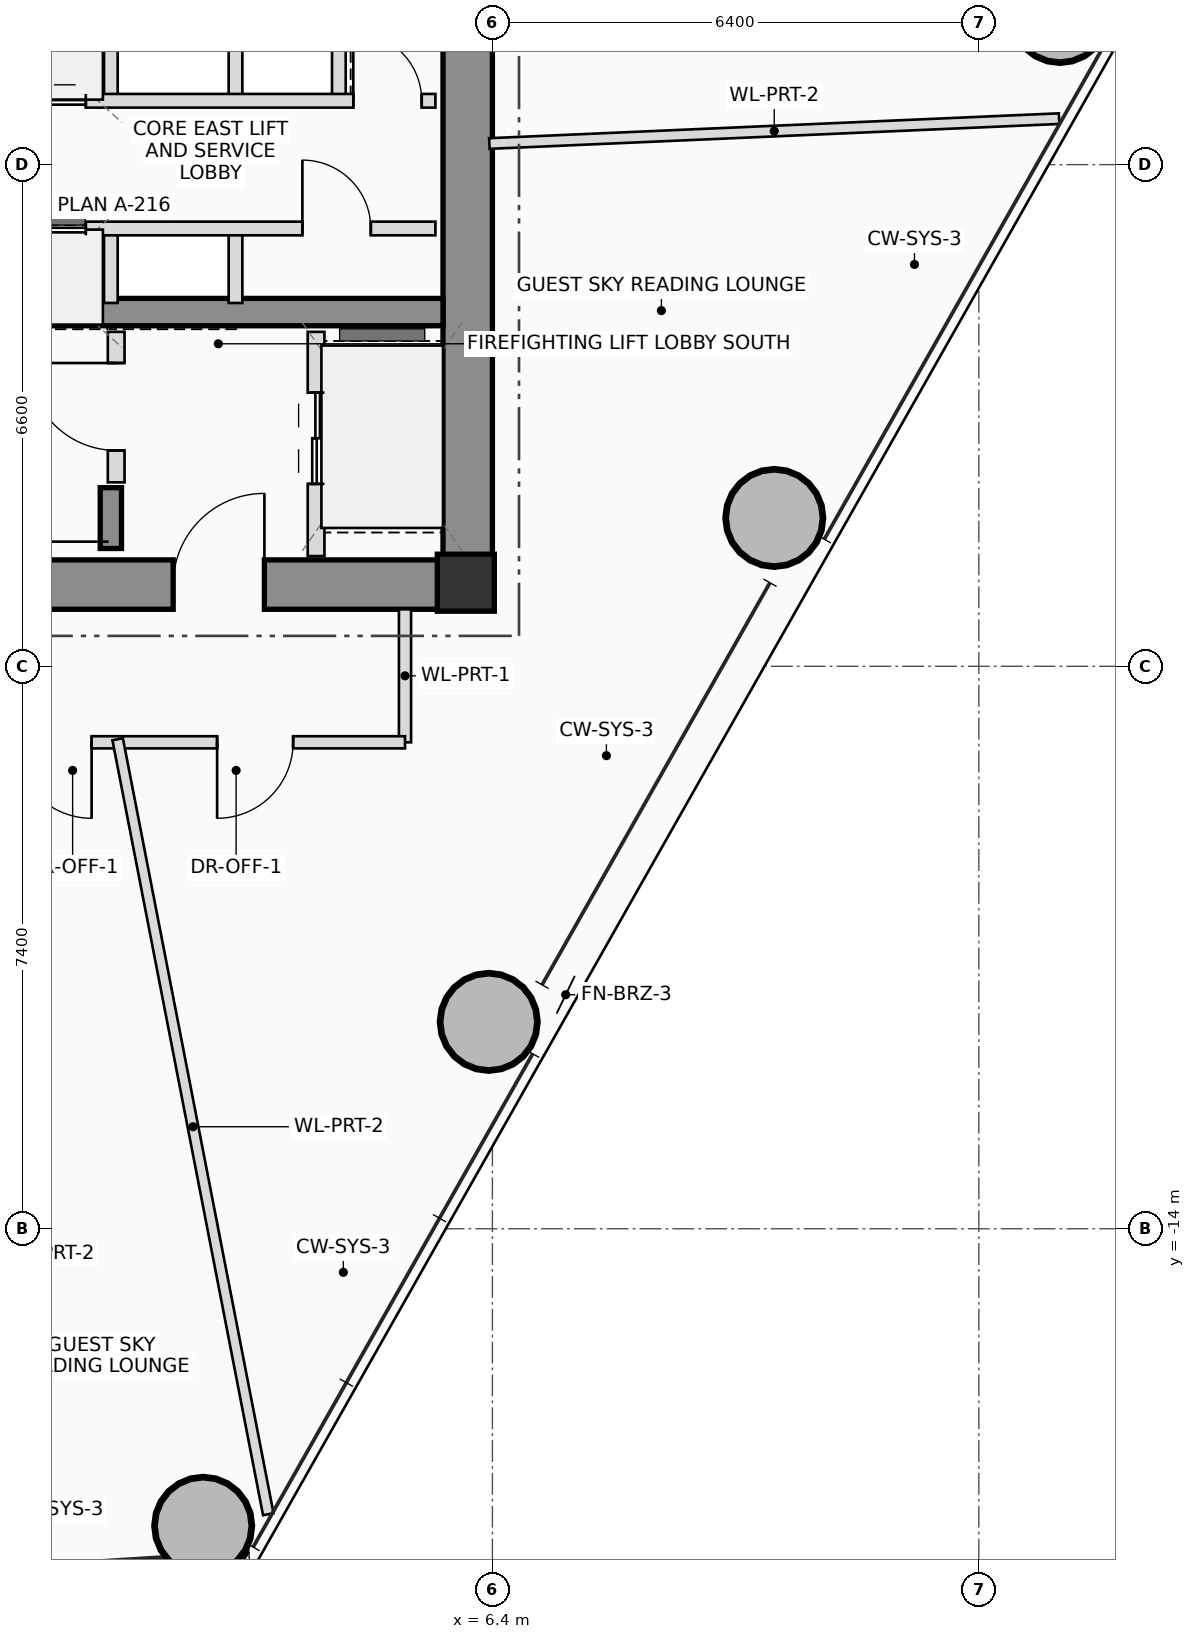
"""IFC4 building model, lengths in metres.
Left out: names, types, materials, properties, quantities, classifications, styles, units other than length and angle.
Written with IfcOpenShell. Run it as: python <this file> out.ifc"""

import sys

from ifc_helpers import new_model, si_unit, direction, frame, frame_2d, origin, origin_2d, place, context, subcontext, project, spatial, rectangle, hollow_circle, extrude, source, transform, mapped, element, fill, save


model = new_model("IFC4")
c1 = context("Model", 3, precision=1e-05, world=origin(), true_north=direction((0.0, 1.0)))
c2 = subcontext(c1, "Body", "Model", "MODEL_VIEW")
j1 = project(units=[si_unit("LENGTHUNIT", "METRE"), si_unit("PLANEANGLEUNIT", "RADIAN")], contexts=[c1])
p1 = place(None, origin())
s1 = spatial("IfcSite", under=j1, at=p1, CompositionType="ELEMENT")
p2 = place(p1, origin())
s2 = spatial("IfcBuilding", under=s1, at=p2, CompositionType="ELEMENT")
p3 = place(p2, frame((0.0, 0.0, 179.45)))
s3 = spatial("IfcBuildingStorey", under=s2, at=p3, CompositionType="ELEMENT", Elevation=179.45)
m1 = source(origin(), c2, "Body", "SweptSolid", [
    extrude(rectangle(XDim=0.75, YDim=0.75, at=origin_2d()), origin(), (0.0, 0.0, 1.0), 3.45),
])
p4 = place(p3, frame((6.05, -5.5, 0.0), z_axis=(0.0, 0.0, 1.0), x_axis=(1.0, 0.0, 0.0)))
e1 = element("IfcColumn", 1, at=p4, inside=s3, PredefinedType="COLUMN", context=c2, shape_type="MappedRepresentation", body=[
    mapped(m1, transform((0.0, 0.0, 0.0), scale=1.0)),
])
p5 = place(p3, frame((-6.4, -5.525, 0.0), z_axis=(0.0, 0.0, 1.0), x_axis=(1.0, 0.0, 0.0)))
e2 = element("IfcWall", 2, at=p5, inside=s3, PredefinedType="SHEAR", context=c2, shape_type="SweptSolid", body=[
    extrude(rectangle(XDim=12.8, YDim=0.65, at=frame_2d((6.4, 0.0))), origin(), (0.0, 0.0, 1.0), 3.45),
])
p6 = place(p5, frame((8.6, 0.0, 0.0)))
e3 = element("IfcOpeningElement", 3, at=p6, cuts=e2, PredefinedType="OPENING", context=c2, shape_type="SweptSolid", body=[
    extrude(rectangle(XDim=1.2, YDim=2.2, at=frame_2d((0.6, 1.1))), frame((0.0, 0.335, 0.0), z_axis=(0.0, -1.0, 0.0), x_axis=(1.0, 0.0, 0.0)), (0.0, 0.0, 1.0), 0.67),
])
p7 = place(p3, frame((6.075, -5.2, 0.0), z_axis=(0.0, 0.0, 1.0), x_axis=(0.0, 1.0, 0.0)))
e4 = element("IfcWall", 4, at=p7, inside=s3, PredefinedType="SHEAR", context=c2, shape_type="SweptSolid", body=[
    extrude(rectangle(XDim=10.4, YDim=0.65, at=frame_2d((5.2, 0.0))), origin(), (0.0, 0.0, 1.0), 3.45),
])
p8 = place(p3, frame((-5.75, -1.94, 0.0), z_axis=(0.0, 0.0, 1.0), x_axis=(1.0, 0.0, 0.0)))
e5 = element("IfcWall", 5, at=p8, inside=s3, PredefinedType="SHEAR", context=c2, shape_type="SweptSolid", body=[
    extrude(rectangle(XDim=11.5, YDim=0.36, at=frame_2d((5.75, 0.0))), origin(), (0.0, 0.0, 1.0), 3.45),
])
p9 = place(p3, frame((1.38, -5.05, 0.0), z_axis=(0.0, 0.0, 1.0), x_axis=(0.0, 1.0, 0.0)))
e6 = element("IfcWall", 6, at=p9, inside=s3, PredefinedType="SHEAR", context=c2, shape_type="SweptSolid", body=[
    extrude(rectangle(XDim=0.8, YDim=0.28, at=frame_2d((0.4, 0.0))), origin(), (0.0, 0.0, 1.0), 3.45),
])
m2 = source(origin(), c2, "Body", "SweptSolid", [
    extrude(hollow_circle(Radius=0.65, WallThickness=0.045, at=origin_2d()), origin(), (0.0, 0.0, 1.0), 3.45),
])
for number, where, z_axis, x_axis in (
    (7, (2.595, -17.908, 0.0), (0.0, 0.0, 1.0), (1.0, 0.0, 0.0)),
    (8, (6.352, -11.278, 0.0), (0.0, 0.0, 1.0), (1.0, 0.0, 0.0)),
    (9, (10.109, -4.648, 0.0), (0.0, 0.0, 1.0), (1.0, 0.0, 0.0)),
    (10, (13.866, 1.982, 0.0), (0.0, 0.0, 1.0), (1.0, 0.0, 0.0)),
):
    element("IfcColumn", number, at=place(p3, frame(where, z_axis=z_axis, x_axis=x_axis)), inside=s3, PredefinedType="COLUMN", context=c2, shape_type="MappedRepresentation", body=[
        mapped(m2, transform((0.0, 0.0, 0.0), scale=1.0)),
    ])
p10 = place(p3, frame((1.45, -4.18, 0.0), z_axis=(0.0, 0.0, 1.0), x_axis=(0.0, 1.0, 0.0)))
e11 = element("IfcWall", 11, at=p10, inside=s3, PredefinedType="PLUMBINGWALL", context=c2, shape_type="SweptSolid", body=[
    extrude(rectangle(XDim=1.98, YDim=0.22, at=frame_2d((0.99, 0.0))), origin(), (0.0, 0.0, 1.0), 3.25),
])
p11 = place(p10, frame((0.42, 0.0, 0.0)))
e12 = element("IfcOpeningElement", 12, at=p11, cuts=e11, PredefinedType="OPENING", context=c2, shape_type="SweptSolid", body=[
    extrude(rectangle(XDim=1.15, YDim=2.15, at=frame_2d((0.575, 1.075))), frame((0.0, 0.12, 0.0), z_axis=(0.0, -1.0, 0.0), x_axis=(1.0, 0.0, 0.0)), (0.0, 0.0, 1.0), 0.24),
])
p12 = place(p3, frame((4.08, -5.15, 0.0), z_axis=(0.0, 0.0, 1.0), x_axis=(0.0, 1.0, 0.0)))
e13 = element("IfcWall", 13, at=p12, inside=s3, PredefinedType="PLUMBINGWALL", context=c2, shape_type="SweptSolid", body=[
    extrude(rectangle(XDim=2.95, YDim=0.22, at=frame_2d((1.475, 0.0))), origin(), (0.0, 0.0, 1.0), 3.25),
])
p13 = place(p12, frame((0.95, 0.0, 0.0)))
e14 = element("IfcOpeningElement", 14, at=p13, cuts=e13, PredefinedType="OPENING", context=c2, shape_type="SweptSolid", body=[
    extrude(rectangle(XDim=1.2, YDim=2.25, at=frame_2d((0.6, 1.125))), frame((0.0, 0.12, 0.0), z_axis=(0.0, -1.0, 0.0), x_axis=(1.0, 0.0, 0.0)), (0.0, 0.0, 1.0), 0.24),
])
for number, where, z_axis, x_axis in (
    (15, (1.38, 0.84, 0.0), (0.0, 0.0, 1.0), (0.0, 1.0, 0.0)),
    (16, (1.38, -1.82, 0.0), (0.0, 0.0, 1.0), (0.0, 1.0, 0.0)),
    (17, (3.02, 0.84, 0.0), (0.0, 0.0, 1.0), (0.0, 1.0, 0.0)),
    (18, (4.38, 0.84, 0.0), (0.0, 0.0, 1.0), (0.0, 1.0, 0.0)),
    (19, (3.02, -1.82, 0.0), (0.0, 0.0, 1.0), (0.0, 1.0, 0.0)),
):
    element("IfcWall", number, at=place(p3, frame(where, z_axis=z_axis, x_axis=x_axis)), inside=s3, PredefinedType="PLUMBINGWALL", context=c2, shape_type="SweptSolid", body=[
        extrude(rectangle(XDim=0.98, YDim=0.18, at=frame_2d((0.49, 0.0))), origin(), (0.0, 0.0, 1.0), 3.25),
    ])
p14 = place(p3, frame((-5.68, 0.84, 0.0), z_axis=(0.0, 0.0, 1.0), x_axis=(1.0, 0.0, 0.0)))
e20 = element("IfcWall", 20, at=p14, inside=s3, PredefinedType="PLUMBINGWALL", context=c2, shape_type="SweptSolid", body=[
    extrude(rectangle(XDim=11.33, YDim=0.18, at=frame_2d((5.665, 0.0))), origin(), (0.0, 0.0, 1.0), 3.25),
])
p15 = place(p14, frame((1.03, 0.0, 0.0)))
e21 = element("IfcOpeningElement", 21, at=p15, cuts=e20, PredefinedType="OPENING", context=c2, shape_type="SweptSolid", body=[
    extrude(rectangle(XDim=0.9, YDim=2.05, at=frame_2d((0.45, 1.025))), frame((0.0, 0.1, 0.0), z_axis=(0.0, -1.0, 0.0), x_axis=(1.0, 0.0, 0.0)), (0.0, 0.0, 1.0), 0.2),
])
p16 = place(p14, frame((3.93, 0.0, 0.0)))
e22 = element("IfcOpeningElement", 22, at=p16, cuts=e20, PredefinedType="OPENING", context=c2, shape_type="SweptSolid", body=[
    extrude(rectangle(XDim=1.1, YDim=2.2, at=frame_2d((0.55, 1.1))), frame((0.0, 0.1, 0.0), z_axis=(0.0, -1.0, 0.0), x_axis=(1.0, 0.0, 0.0)), (0.0, 0.0, 1.0), 0.2),
])
p17 = place(p14, frame((5.63, 0.0, 0.0)))
e23 = element("IfcOpeningElement", 23, at=p17, cuts=e20, PredefinedType="OPENING", context=c2, shape_type="SweptSolid", body=[
    extrude(rectangle(XDim=1.1, YDim=2.2, at=frame_2d((0.55, 1.1))), frame((0.0, 0.1, 0.0), z_axis=(0.0, -1.0, 0.0), x_axis=(1.0, 0.0, 0.0)), (0.0, 0.0, 1.0), 0.2),
])
p18 = place(p14, frame((10.25, 0.0, 0.0)))
e24 = element("IfcOpeningElement", 24, at=p18, cuts=e20, PredefinedType="OPENING", context=c2, shape_type="SweptSolid", body=[
    extrude(rectangle(XDim=0.9, YDim=2.05, at=frame_2d((0.45, 1.025))), frame((0.0, 0.1, 0.0), z_axis=(0.0, -1.0, 0.0), x_axis=(1.0, 0.0, 0.0)), (0.0, 0.0, 1.0), 0.2),
])
p19 = place(p3, frame((-5.68, -0.84, 0.0), z_axis=(0.0, 0.0, 1.0), x_axis=(1.0, 0.0, 0.0)))
e25 = element("IfcWall", 25, at=p19, inside=s3, PredefinedType="PLUMBINGWALL", context=c2, shape_type="SweptSolid", body=[
    extrude(rectangle(XDim=11.33, YDim=0.18, at=frame_2d((5.665, 0.0))), origin(), (0.0, 0.0, 1.0), 3.25),
])
p20 = place(p19, frame((1.73, 0.0, 0.0)))
e26 = element("IfcOpeningElement", 26, at=p20, cuts=e25, PredefinedType="OPENING", context=c2, shape_type="SweptSolid", body=[
    extrude(rectangle(XDim=0.9, YDim=2.05, at=frame_2d((0.45, 1.025))), frame((0.0, 0.1, 0.0), z_axis=(0.0, -1.0, 0.0), x_axis=(1.0, 0.0, 0.0)), (0.0, 0.0, 1.0), 0.2),
])
p21 = place(p19, frame((3.93, 0.0, 0.0)))
e27 = element("IfcOpeningElement", 27, at=p21, cuts=e25, PredefinedType="OPENING", context=c2, shape_type="SweptSolid", body=[
    extrude(rectangle(XDim=1.1, YDim=2.2, at=frame_2d((0.55, 1.1))), frame((0.0, 0.1, 0.0), z_axis=(0.0, -1.0, 0.0), x_axis=(1.0, 0.0, 0.0)), (0.0, 0.0, 1.0), 0.2),
])
p22 = place(p19, frame((5.63, 0.0, 0.0)))
e28 = element("IfcOpeningElement", 28, at=p22, cuts=e25, PredefinedType="OPENING", context=c2, shape_type="SweptSolid", body=[
    extrude(rectangle(XDim=1.1, YDim=2.2, at=frame_2d((0.55, 1.1))), frame((0.0, 0.1, 0.0), z_axis=(0.0, -1.0, 0.0), x_axis=(1.0, 0.0, 0.0)), (0.0, 0.0, 1.0), 0.2),
])
p23 = place(p19, frame((9.58, 0.0, 0.0)))
e29 = element("IfcOpeningElement", 29, at=p23, cuts=e25, PredefinedType="OPENING", context=c2, shape_type="SweptSolid", body=[
    extrude(rectangle(XDim=0.9, YDim=2.05, at=frame_2d((0.45, 1.025))), frame((0.0, 0.1, 0.0), z_axis=(0.0, -1.0, 0.0), x_axis=(1.0, 0.0, 0.0)), (0.0, 0.0, 1.0), 0.2),
])
p24 = place(p3, frame((5.25, -5.85, 0.0), z_axis=(0.0, 0.0, 1.0), x_axis=(0.0, -1.0, 0.0)))
e30 = element("IfcWall", 30, at=p24, inside=s3, PredefinedType="PARTITIONING", context=c2, shape_type="SweptSolid", body=[
    extrude(rectangle(XDim=1.75, YDim=0.16, at=frame_2d((0.875, 0.0))), origin(), (0.0, 0.0, 1.0), 3.25),
])
p25 = place(p3, frame((5.25, -7.6, 0.0), z_axis=(0.0, 0.0, 1.0), x_axis=(-1.0, 0.0, 0.0)))
e31 = element("IfcWall", 31, at=p25, inside=s3, PredefinedType="PARTITIONING", context=c2, shape_type="SweptSolid", body=[
    extrude(rectangle(XDim=11.61, YDim=0.16, at=frame_2d((5.805, 0.0))), origin(), (0.0, 0.0, 1.0), 2.605),
])
p26 = place(p25, frame((1.472, 0.0, 0.0)))
e32 = element("IfcOpeningElement", 32, at=p26, cuts=e31, PredefinedType="OPENING", context=c2, shape_type="SweptSolid", body=[
    extrude(rectangle(XDim=1.0, YDim=2.25, at=frame_2d((0.5, 1.125))), frame((0.0, 0.09, 0.0), z_axis=(0.0, -1.0, 0.0), x_axis=(1.0, 0.0, 0.0)), (0.0, 0.0, 1.0), 0.18),
])
p27 = place(p25, frame((4.123, 0.0, 0.0)))
e33 = element("IfcOpeningElement", 33, at=p27, cuts=e31, PredefinedType="OPENING", context=c2, shape_type="SweptSolid", body=[
    extrude(rectangle(XDim=1.0, YDim=2.25, at=frame_2d((0.5, 1.125))), frame((0.0, 0.09, 0.0), z_axis=(0.0, -1.0, 0.0), x_axis=(1.0, 0.0, 0.0)), (0.0, 0.0, 1.0), 0.18),
])
p28 = place(p25, frame((7.589, 0.0, 0.0)))
e34 = element("IfcOpeningElement", 34, at=p28, cuts=e31, PredefinedType="OPENING", context=c2, shape_type="SweptSolid", body=[
    extrude(rectangle(XDim=1.05, YDim=2.2, at=frame_2d((0.525, 1.1))), frame((0.0, 0.09, 0.0), z_axis=(0.0, -1.0, 0.0), x_axis=(1.0, 0.0, 0.0)), (0.0, 0.0, 1.0), 0.18),
])
p29 = place(p3, frame((6.36, 0.278, 0.0), z_axis=(0.0, 0.0, 1.0), x_axis=(0.999047543566, 0.043634913719, 0.0)))
e35 = element("IfcWall", 35, at=p29, inside=s3, PredefinedType="PARTITIONING", context=c2, shape_type="SweptSolid", body=[
    extrude(rectangle(XDim=7.503, YDim=0.14, at=frame_2d((3.751, 0.0))), origin(), (0.0, 0.0, 1.0), 2.605),
])
p30 = place(p3, frame((1.469, -7.56, 0.0), z_axis=(0.0, 0.0, 1.0), x_axis=(0.190824358974, -0.981624196942, 0.0)))
e36 = element("IfcWall", 36, at=p30, inside=s3, PredefinedType="PARTITIONING", context=c2, shape_type="SweptSolid", body=[
    extrude(rectangle(XDim=10.386, YDim=0.14, at=frame_2d((5.193, 0.0))), origin(), (0.0, 0.0, 1.0), 2.605),
])
p31 = place(p6, origin())
e37 = element("IfcDoor", 37, at=p31, inside=s3, OperationType="SINGLE_SWING_RIGHT", PredefinedType="DOOR", context=c2, shape_type="SweptSolid", body=[
    extrude(rectangle(XDim=1.2, YDim=2.2, at=frame_2d((0.6, 1.1))), frame((0.0, 0.025, 0.0), z_axis=(0.0, -1.0, 0.0), x_axis=(1.0, 0.0, 0.0)), (0.0, 0.0, 1.0), 0.05),
])
fill(e3, e37)
p32 = place(p11, origin())
e38 = element("IfcDoor", 38, at=p32, inside=s3, OperationType="SINGLE_SWING_RIGHT", PredefinedType="DOOR", context=c2, shape_type="SweptSolid", body=[
    extrude(rectangle(XDim=1.15, YDim=2.15, at=frame_2d((0.575, 1.075))), frame((0.0, 0.025, 0.0), z_axis=(0.0, -1.0, 0.0), x_axis=(1.0, 0.0, 0.0)), (0.0, 0.0, 1.0), 0.05),
])
fill(e12, e38)
p33 = place(p13, origin())
e39 = element("IfcDoor", 39, at=p33, inside=s3, OperationType="DOUBLE_DOOR_SLIDING", PredefinedType="DOOR", context=c2, shape_type="SweptSolid", body=[
    extrude(rectangle(XDim=1.2, YDim=2.25, at=frame_2d((0.6, 1.125))), frame((0.0, 0.025, 0.0), z_axis=(0.0, -1.0, 0.0), x_axis=(1.0, 0.0, 0.0)), (0.0, 0.0, 1.0), 0.05),
])
fill(e14, e39)
p34 = place(p17, origin())
e40 = element("IfcDoor", 40, at=p34, inside=s3, OperationType="DOUBLE_DOOR_SLIDING", PredefinedType="DOOR", context=c2, shape_type="SweptSolid", body=[
    extrude(rectangle(XDim=1.1, YDim=2.2, at=frame_2d((0.55, 1.1))), frame((0.0, 0.025, 0.0), z_axis=(0.0, -1.0, 0.0), x_axis=(1.0, 0.0, 0.0)), (0.0, 0.0, 1.0), 0.05),
])
fill(e23, e40)
p35 = place(p18, origin())
e41 = element("IfcDoor", 41, at=p35, inside=s3, OperationType="SINGLE_SWING_LEFT", PredefinedType="DOOR", context=c2, shape_type="SweptSolid", body=[
    extrude(rectangle(XDim=0.9, YDim=2.05, at=frame_2d((0.45, 1.025))), frame((0.0, 0.025, 0.0), z_axis=(0.0, -1.0, 0.0), x_axis=(1.0, 0.0, 0.0)), (0.0, 0.0, 1.0), 0.05),
])
fill(e24, e41)
p36 = place(p22, origin())
e42 = element("IfcDoor", 42, at=p36, inside=s3, OperationType="DOUBLE_DOOR_SLIDING", PredefinedType="DOOR", context=c2, shape_type="SweptSolid", body=[
    extrude(rectangle(XDim=1.1, YDim=2.2, at=frame_2d((0.55, 1.1))), frame((0.0, 0.025, 0.0), z_axis=(0.0, -1.0, 0.0), x_axis=(1.0, 0.0, 0.0)), (0.0, 0.0, 1.0), 0.05),
])
fill(e28, e42)
p37 = place(p23, origin())
e43 = element("IfcDoor", 43, at=p37, inside=s3, OperationType="SINGLE_SWING_LEFT", PredefinedType="DOOR", context=c2, shape_type="SweptSolid", body=[
    extrude(rectangle(XDim=0.9, YDim=2.05, at=frame_2d((0.45, 1.025))), frame((0.0, 0.025, 0.0), z_axis=(0.0, -1.0, 0.0), x_axis=(1.0, 0.0, 0.0)), (0.0, 0.0, 1.0), 0.05),
])
fill(e29, e43)
p38 = place(p26, origin())
e44 = element("IfcDoor", 44, at=p38, inside=s3, OperationType="SINGLE_SWING_RIGHT", PredefinedType="DOOR", context=c2, shape_type="SweptSolid", body=[
    extrude(rectangle(XDim=1.0, YDim=2.25, at=frame_2d((0.5, 1.125))), frame((0.0, 0.025, 0.0), z_axis=(0.0, -1.0, 0.0), x_axis=(1.0, 0.0, 0.0)), (0.0, 0.0, 1.0), 0.05),
])
fill(e32, e44)
p39 = place(p27, origin())
e45 = element("IfcDoor", 45, at=p39, inside=s3, OperationType="SINGLE_SWING_LEFT", PredefinedType="DOOR", context=c2, shape_type="SweptSolid", body=[
    extrude(rectangle(XDim=1.0, YDim=2.25, at=frame_2d((0.5, 1.125))), frame((0.0, 0.025, 0.0), z_axis=(0.0, -1.0, 0.0), x_axis=(1.0, 0.0, 0.0)), (0.0, 0.0, 1.0), 0.05),
])
fill(e33, e45)
save(model, sys.argv[1])
